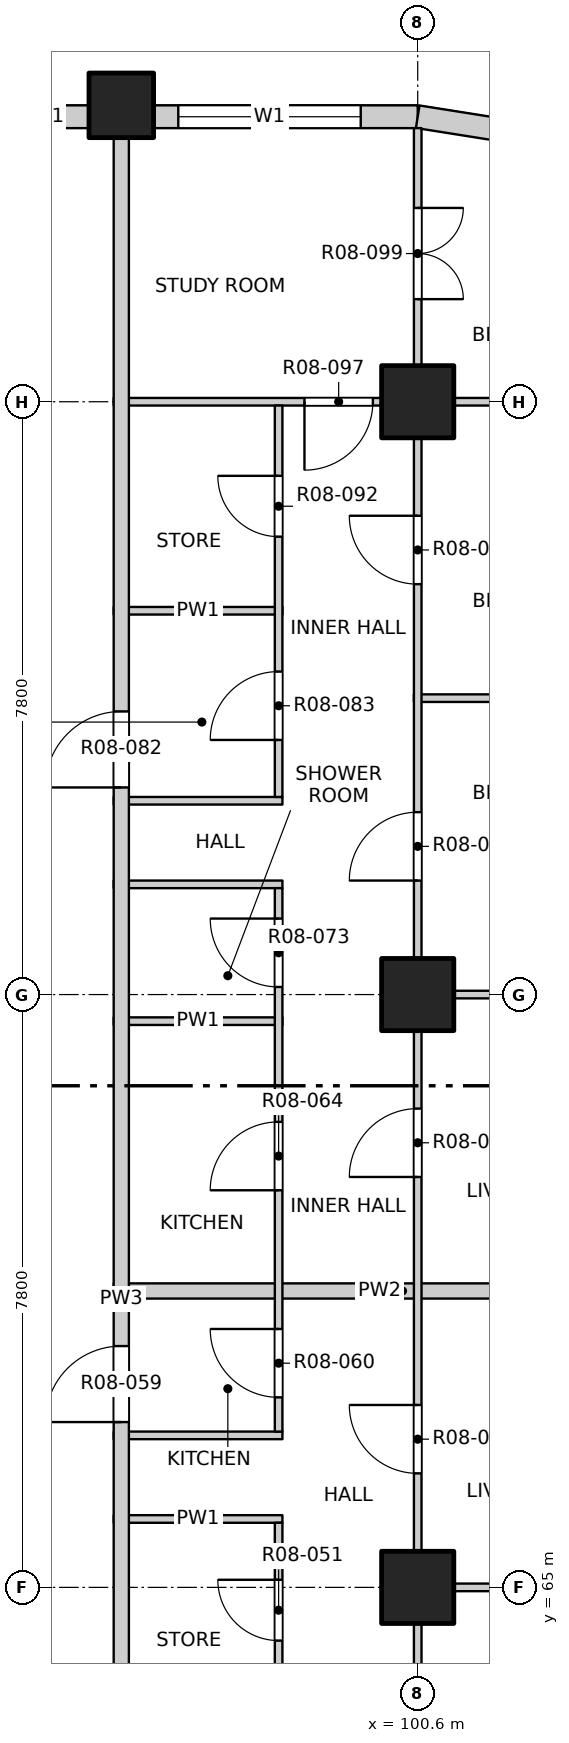
"""IFC4 building model, lengths in metres.
Left out: names, types, materials, properties, quantities, classifications, styles, units other than length and angle.
Written with IfcOpenShell. Run it as: python <this file> out.ifc"""

import sys

from ifc_helpers import new_model, si_unit, direction, frame, frame_2d, origin, origin_2d, place, context, subcontext, project, spatial, rectangle, extrude, element, fill, save


model = new_model("IFC4")
c1 = context("Model", 3, precision=1e-05, world=origin(), true_north=direction((0.0, 1.0)))
c2 = subcontext(c1, "Body", "Model", "MODEL_VIEW")
j1 = project(units=[si_unit("LENGTHUNIT", "METRE"), si_unit("PLANEANGLEUNIT", "RADIAN")], contexts=[c1])
p1 = place(None, origin())
s1 = spatial("IfcSite", under=j1, at=p1, CompositionType="ELEMENT")
p2 = place(p1, origin())
s2 = spatial("IfcBuilding", under=s1, at=p2, CompositionType="ELEMENT")
p3 = place(p2, frame((0.0, 0.0, 103.3)))
s3 = spatial("IfcBuildingStorey", under=s2, at=p3, CompositionType="ELEMENT", Elevation=103.3)
p4 = place(p3, frame((96.7, 84.5, -0.25), z_axis=(0.0, 0.0, 1.0), x_axis=(1.0, 0.0, 0.0)))
e1 = element("IfcColumn", 1, at=p4, inside=s3, PredefinedType="COLUMN", context=c2, shape_type="SweptSolid", body=[
    extrude(rectangle(XDim=0.85, YDim=0.85, at=origin_2d()), origin(), (0.0, 0.0, 1.0), 3.4),
])
for number, where, z_axis, x_axis in (
    (2, (100.6, 65.0, -0.25), (0.0, 0.0, 1.0), (1.0, 0.0, 0.0)),
    (3, (100.6, 72.8, -0.25), (0.0, 0.0, 1.0), (1.0, 0.0, 0.0)),
    (4, (100.6, 80.6, -0.25), (0.0, 0.0, 1.0), (1.0, 0.0, 0.0)),
):
    element("IfcColumn", number, at=place(p3, frame(where, z_axis=z_axis, x_axis=x_axis)), inside=s3, PredefinedType="COLUMN", context=c2, shape_type="SweptSolid", body=[
        extrude(rectangle(XDim=0.95, YDim=0.95, at=origin_2d()), origin(), (0.0, 0.0, 1.0), 3.4),
    ])
p5 = place(p3, frame((95.025, 84.35, 0.0), z_axis=(0.0, 0.0, 1.0), x_axis=(1.0, 0.0, 0.0)))
e5 = element("IfcWall", 5, at=p5, inside=s3, PredefinedType="SOLIDWALL", context=c2, shape_type="SweptSolid", body=[
    extrude(rectangle(XDim=1.25, YDim=0.3, at=frame_2d((0.625, 0.0))), origin(), (0.0, 0.0, 1.0), 2.7),
])
p6 = place(p3, frame((97.125, 84.35, 0.0), z_axis=(0.0, 0.0, 1.0), x_axis=(1.0, 0.0, 0.0)))
e6 = element("IfcWall", 6, at=p6, inside=s3, PredefinedType="SOLIDWALL", context=c2, shape_type="SweptSolid", body=[
    extrude(rectangle(XDim=3.475, YDim=0.3, at=frame_2d((1.738, 0.0))), origin(), (0.0, 0.0, 1.0), 2.7),
])
p7 = place(p6, frame((0.325, 0.0, 0.9)))
e7 = element("IfcOpeningElement", 7, at=p7, cuts=e6, PredefinedType="OPENING", context=c2, shape_type="SweptSolid", body=[
    extrude(rectangle(XDim=2.4, YDim=1.8, at=frame_2d((1.2, 0.9))), frame((0.0, 0.16, 0.0), z_axis=(0.0, -1.0, 0.0), x_axis=(1.0, 0.0, 0.0)), (0.0, 0.0, 1.0), 0.32),
])
p8 = place(p3, frame((101.759, 84.167, 0.0), z_axis=(0.0, 0.0, 1.0), x_axis=(-0.987678452879, 0.156496880861, 0.0)))
e8 = element("IfcWall", 8, at=p8, inside=s3, PredefinedType="SOLIDWALL", context=c2, shape_type="SweptSolid", body=[
    extrude(rectangle(XDim=1.173, YDim=0.3, at=frame_2d((0.586, 0.0))), origin(), (0.0, 0.0, 1.0), 2.7),
])
p9 = place(p3, frame((100.55, 65.0, 0.0), z_axis=(0.0, 0.0, 1.0), x_axis=(1.0, 0.0, 0.0)))
e9 = element("IfcWall", 9, at=p9, inside=s3, PredefinedType="PARTITIONING", context=c2, shape_type="SweptSolid", body=[
    extrude(rectangle(XDim=3.65, YDim=0.1, at=frame_2d((1.825, 0.0))), origin(), (0.0, 0.0, 1.0), 3.15),
])
for number, where, z_axis, x_axis in (
    (10, (96.6, 65.9, 0.0), (0.0, 0.0, 1.0), (1.0, 0.0, 0.0)),
    (11, (96.6, 67.0, 0.0), (0.0, 0.0, 1.0), (1.0, 0.0, 0.0)),
):
    element("IfcWall", number, at=place(p3, frame(where, z_axis=z_axis, x_axis=x_axis)), inside=s3, PredefinedType="PARTITIONING", context=c2, shape_type="SweptSolid", body=[
        extrude(rectangle(XDim=2.22, YDim=0.1, at=frame_2d((1.11, 0.0))), origin(), (0.0, 0.0, 1.0), 3.15),
    ])
p10 = place(p3, frame((96.6, 68.9, 0.0), z_axis=(0.0, 0.0, 1.0), x_axis=(1.0, 0.0, 0.0)))
e12 = element("IfcWall", 12, at=p10, inside=s3, PredefinedType="PARTITIONING", context=c2, shape_type="SweptSolid", body=[
    extrude(rectangle(XDim=7.6, YDim=0.2, at=frame_2d((3.8, 0.0))), origin(), (0.0, 0.0, 1.0), 2.55),
])
p11 = place(p3, frame((96.6, 72.45, 0.0), z_axis=(0.0, 0.0, 1.0), x_axis=(1.0, 0.0, 0.0)))
e13 = element("IfcWall", 13, at=p11, inside=s3, PredefinedType="PARTITIONING", context=c2, shape_type="SweptSolid", body=[
    extrude(rectangle(XDim=2.22, YDim=0.1, at=frame_2d((1.11, 0.0))), origin(), (0.0, 0.0, 1.0), 3.15),
])
p12 = place(p3, frame((100.55, 72.8, 0.0), z_axis=(0.0, 0.0, 1.0), x_axis=(1.0, 0.0, 0.0)))
e14 = element("IfcWall", 14, at=p12, inside=s3, PredefinedType="PARTITIONING", context=c2, shape_type="SweptSolid", body=[
    extrude(rectangle(XDim=3.65, YDim=0.1, at=frame_2d((1.825, 0.0))), origin(), (0.0, 0.0, 1.0), 3.15),
])
for number, where, z_axis, x_axis in (
    (15, (96.6, 74.25, 0.0), (0.0, 0.0, 1.0), (1.0, 0.0, 0.0)),
    (16, (96.6, 75.35, 0.0), (0.0, 0.0, 1.0), (1.0, 0.0, 0.0)),
):
    element("IfcWall", number, at=place(p3, frame(where, z_axis=z_axis, x_axis=x_axis)), inside=s3, PredefinedType="PARTITIONING", context=c2, shape_type="SweptSolid", body=[
        extrude(rectangle(XDim=2.22, YDim=0.1, at=frame_2d((1.11, 0.0))), origin(), (0.0, 0.0, 1.0), 3.15),
    ])
p13 = place(p3, frame((100.55, 76.7, 0.0), z_axis=(0.0, 0.0, 1.0), x_axis=(1.0, 0.0, 0.0)))
e17 = element("IfcWall", 17, at=p13, inside=s3, PredefinedType="PARTITIONING", context=c2, shape_type="SweptSolid", body=[
    extrude(rectangle(XDim=3.65, YDim=0.1, at=frame_2d((1.825, 0.0))), origin(), (0.0, 0.0, 1.0), 2.55),
])
p14 = place(p3, frame((96.6, 77.85, 0.0), z_axis=(0.0, 0.0, 1.0), x_axis=(1.0, 0.0, 0.0)))
e18 = element("IfcWall", 18, at=p14, inside=s3, PredefinedType="PARTITIONING", context=c2, shape_type="SweptSolid", body=[
    extrude(rectangle(XDim=2.22, YDim=0.1, at=frame_2d((1.11, 0.0))), origin(), (0.0, 0.0, 1.0), 3.15),
])
p15 = place(p3, frame((96.6, 80.6, 0.0), z_axis=(0.0, 0.0, 1.0), x_axis=(1.0, 0.0, 0.0)))
e19 = element("IfcWall", 19, at=p15, inside=s3, PredefinedType="PARTITIONING", context=c2, shape_type="SweptSolid", body=[
    extrude(rectangle(XDim=7.6, YDim=0.1, at=frame_2d((3.8, 0.0))), origin(), (0.0, 0.0, 1.0), 3.15),
])
p16 = place(p15, frame((2.51, 0.0, 0.0)))
e20 = element("IfcOpeningElement", 20, at=p16, cuts=e19, PredefinedType="OPENING", context=c2, shape_type="SweptSolid", body=[
    extrude(rectangle(XDim=0.9, YDim=2.1, at=frame_2d((0.45, 1.05))), frame((0.0, 0.06, 0.0), z_axis=(0.0, -1.0, 0.0), x_axis=(1.0, 0.0, 0.0)), (0.0, 0.0, 1.0), 0.12),
])
p17 = place(p3, frame((96.7, 53.4, 0.0), z_axis=(0.0, 0.0, 1.0), x_axis=(0.0, 1.0, 0.0)))
e21 = element("IfcWall", 21, at=p17, inside=s3, PredefinedType="PARTITIONING", context=c2, shape_type="SweptSolid", body=[
    extrude(rectangle(XDim=30.8, YDim=0.2, at=frame_2d((15.4, 0.0))), origin(), (0.0, 0.0, 1.0), 3.15),
])
p18 = place(p17, frame((5.525, 0.0, 0.0)))
e22 = element("IfcOpeningElement", 22, at=p18, cuts=e21, PredefinedType="OPENING", context=c2, shape_type="SweptSolid", body=[
    extrude(rectangle(XDim=1.0, YDim=2.1, at=frame_2d((0.5, 1.05))), frame((0.0, 0.11, 0.0), z_axis=(0.0, -1.0, 0.0), x_axis=(1.0, 0.0, 0.0)), (0.0, 0.0, 1.0), 0.22),
])
p19 = place(p17, frame((13.775, 0.0, 0.0)))
e23 = element("IfcOpeningElement", 23, at=p19, cuts=e21, PredefinedType="OPENING", context=c2, shape_type="SweptSolid", body=[
    extrude(rectangle(XDim=1.0, YDim=2.1, at=frame_2d((0.5, 1.05))), frame((0.0, 0.11, 0.0), z_axis=(0.0, -1.0, 0.0), x_axis=(1.0, 0.0, 0.0)), (0.0, 0.0, 1.0), 0.22),
])
p20 = place(p17, frame((22.125, 0.0, 0.0)))
e24 = element("IfcOpeningElement", 24, at=p20, cuts=e21, PredefinedType="OPENING", context=c2, shape_type="SweptSolid", body=[
    extrude(rectangle(XDim=1.0, YDim=2.1, at=frame_2d((0.5, 1.05))), frame((0.0, 0.11, 0.0), z_axis=(0.0, -1.0, 0.0), x_axis=(1.0, 0.0, 0.0)), (0.0, 0.0, 1.0), 0.22),
])
p21 = place(p3, frame((98.77, 58.8, 0.0), z_axis=(0.0, 0.0, 1.0), x_axis=(0.0, 1.0, 0.0)))
e25 = element("IfcWall", 25, at=p21, inside=s3, PredefinedType="PARTITIONING", context=c2, shape_type="SweptSolid", body=[
    extrude(rectangle(XDim=7.05, YDim=0.1, at=frame_2d((3.525, 0.0))), origin(), (0.0, 0.0, 1.0), 3.15),
])
p22 = place(p21, frame((0.675, 0.0, 0.0)))
e26 = element("IfcOpeningElement", 26, at=p22, cuts=e25, PredefinedType="OPENING", context=c2, shape_type="SweptSolid", body=[
    extrude(rectangle(XDim=0.9, YDim=2.1, at=frame_2d((0.45, 1.05))), frame((0.0, 0.06, 0.0), z_axis=(0.0, -1.0, 0.0), x_axis=(1.0, 0.0, 0.0)), (0.0, 0.0, 1.0), 0.12),
])
p23 = place(p21, frame((3.05, 0.0, 0.0)))
e27 = element("IfcOpeningElement", 27, at=p23, cuts=e25, PredefinedType="OPENING", context=c2, shape_type="SweptSolid", body=[
    extrude(rectangle(XDim=0.9, YDim=2.1, at=frame_2d((0.45, 1.05))), frame((0.0, 0.06, 0.0), z_axis=(0.0, -1.0, 0.0), x_axis=(1.0, 0.0, 0.0)), (0.0, 0.0, 1.0), 0.12),
])
p24 = place(p21, frame((5.5, 0.0, 0.0)))
e28 = element("IfcOpeningElement", 28, at=p24, cuts=e25, PredefinedType="OPENING", context=c2, shape_type="SweptSolid", body=[
    extrude(rectangle(XDim=0.8, YDim=2.1, at=frame_2d((0.4, 1.05))), frame((0.0, 0.06, 0.0), z_axis=(0.0, -1.0, 0.0), x_axis=(1.0, 0.0, 0.0)), (0.0, 0.0, 1.0), 0.12),
])
p25 = place(p3, frame((98.77, 67.05, 0.0), z_axis=(0.0, 0.0, 1.0), x_axis=(0.0, 1.0, 0.0)))
e29 = element("IfcWall", 29, at=p25, inside=s3, PredefinedType="PARTITIONING", context=c2, shape_type="SweptSolid", body=[
    extrude(rectangle(XDim=7.15, YDim=0.1, at=frame_2d((3.575, 0.0))), origin(), (0.0, 0.0, 1.0), 3.15),
])
p26 = place(p25, frame((0.45, 0.0, 0.0)))
e30 = element("IfcOpeningElement", 30, at=p26, cuts=e29, PredefinedType="OPENING", context=c2, shape_type="SweptSolid", body=[
    extrude(rectangle(XDim=0.9, YDim=2.1, at=frame_2d((0.45, 1.05))), frame((0.0, 0.06, 0.0), z_axis=(0.0, -1.0, 0.0), x_axis=(1.0, 0.0, 0.0)), (0.0, 0.0, 1.0), 0.12),
])
p27 = place(p25, frame((3.175, 0.0, 0.0)))
e31 = element("IfcOpeningElement", 31, at=p27, cuts=e29, PredefinedType="OPENING", context=c2, shape_type="SweptSolid", body=[
    extrude(rectangle(XDim=0.9, YDim=2.1, at=frame_2d((0.45, 1.05))), frame((0.0, 0.06, 0.0), z_axis=(0.0, -1.0, 0.0), x_axis=(1.0, 0.0, 0.0)), (0.0, 0.0, 1.0), 0.12),
])
p28 = place(p25, frame((5.85, 0.0, 0.0)))
e32 = element("IfcOpeningElement", 32, at=p28, cuts=e29, PredefinedType="OPENING", context=c2, shape_type="SweptSolid", body=[
    extrude(rectangle(XDim=0.9, YDim=2.1, at=frame_2d((0.45, 1.05))), frame((0.0, 0.06, 0.0), z_axis=(0.0, -1.0, 0.0), x_axis=(1.0, 0.0, 0.0)), (0.0, 0.0, 1.0), 0.12),
])
p29 = place(p3, frame((98.77, 75.4, 0.0), z_axis=(0.0, 0.0, 1.0), x_axis=(0.0, 1.0, 0.0)))
e33 = element("IfcWall", 33, at=p29, inside=s3, PredefinedType="PARTITIONING", context=c2, shape_type="SweptSolid", body=[
    extrude(rectangle(XDim=5.15, YDim=0.1, at=frame_2d((2.575, 0.0))), origin(), (0.0, 0.0, 1.0), 3.15),
])
p30 = place(p29, frame((0.75, 0.0, 0.0)))
e34 = element("IfcOpeningElement", 34, at=p30, cuts=e33, PredefinedType="OPENING", context=c2, shape_type="SweptSolid", body=[
    extrude(rectangle(XDim=0.9, YDim=2.1, at=frame_2d((0.45, 1.05))), frame((0.0, 0.06, 0.0), z_axis=(0.0, -1.0, 0.0), x_axis=(1.0, 0.0, 0.0)), (0.0, 0.0, 1.0), 0.12),
])
p31 = place(p29, frame((3.425, 0.0, 0.0)))
e35 = element("IfcOpeningElement", 35, at=p31, cuts=e33, PredefinedType="OPENING", context=c2, shape_type="SweptSolid", body=[
    extrude(rectangle(XDim=0.8, YDim=2.1, at=frame_2d((0.4, 1.05))), frame((0.0, 0.06, 0.0), z_axis=(0.0, -1.0, 0.0), x_axis=(1.0, 0.0, 0.0)), (0.0, 0.0, 1.0), 0.12),
])
p32 = place(p3, frame((100.6, 45.8, 0.0), z_axis=(0.0, 0.0, 1.0), x_axis=(0.0, 1.0, 0.0)))
e36 = element("IfcWall", 36, at=p32, inside=s3, PredefinedType="PARTITIONING", context=c2, shape_type="SweptSolid", body=[
    extrude(rectangle(XDim=38.4, YDim=0.1, at=frame_2d((19.2, 0.0))), origin(), (0.0, 0.0, 1.0), 3.15),
])
p33 = place(p32, frame((1.05, 0.0, 0.0)))
e37 = element("IfcOpeningElement", 37, at=p33, cuts=e36, PredefinedType="OPENING", context=c2, shape_type="SweptSolid", body=[
    extrude(rectangle(XDim=1.2, YDim=2.1, at=frame_2d((0.6, 1.05))), frame((0.0, 0.06, 0.0), z_axis=(0.0, -1.0, 0.0), x_axis=(1.0, 0.0, 0.0)), (0.0, 0.0, 1.0), 0.12),
])
p34 = place(p32, frame((5.1, 0.0, 0.0)))
e38 = element("IfcOpeningElement", 38, at=p34, cuts=e36, PredefinedType="OPENING", context=c2, shape_type="SweptSolid", body=[
    extrude(rectangle(XDim=0.9, YDim=2.1, at=frame_2d((0.45, 1.05))), frame((0.0, 0.06, 0.0), z_axis=(0.0, -1.0, 0.0), x_axis=(1.0, 0.0, 0.0)), (0.0, 0.0, 1.0), 0.12),
])
p35 = place(p32, frame((9.0, 0.0, 0.0)))
e39 = element("IfcOpeningElement", 39, at=p35, cuts=e36, PredefinedType="OPENING", context=c2, shape_type="SweptSolid", body=[
    extrude(rectangle(XDim=0.9, YDim=2.1, at=frame_2d((0.45, 1.05))), frame((0.0, 0.06, 0.0), z_axis=(0.0, -1.0, 0.0), x_axis=(1.0, 0.0, 0.0)), (0.0, 0.0, 1.0), 0.12),
])
p36 = place(p32, frame((12.9, 0.0, 0.0)))
e40 = element("IfcOpeningElement", 40, at=p36, cuts=e36, PredefinedType="OPENING", context=c2, shape_type="SweptSolid", body=[
    extrude(rectangle(XDim=0.9, YDim=2.1, at=frame_2d((0.45, 1.05))), frame((0.0, 0.06, 0.0), z_axis=(0.0, -1.0, 0.0), x_axis=(1.0, 0.0, 0.0)), (0.0, 0.0, 1.0), 0.12),
])
p37 = place(p32, frame((16.8, 0.0, 0.0)))
e41 = element("IfcOpeningElement", 41, at=p37, cuts=e36, PredefinedType="OPENING", context=c2, shape_type="SweptSolid", body=[
    extrude(rectangle(XDim=0.9, YDim=2.1, at=frame_2d((0.45, 1.05))), frame((0.0, 0.06, 0.0), z_axis=(0.0, -1.0, 0.0), x_axis=(1.0, 0.0, 0.0)), (0.0, 0.0, 1.0), 0.12),
])
p38 = place(p32, frame((20.7, 0.0, 0.0)))
e42 = element("IfcOpeningElement", 42, at=p38, cuts=e36, PredefinedType="OPENING", context=c2, shape_type="SweptSolid", body=[
    extrude(rectangle(XDim=0.9, YDim=2.1, at=frame_2d((0.45, 1.05))), frame((0.0, 0.06, 0.0), z_axis=(0.0, -1.0, 0.0), x_axis=(1.0, 0.0, 0.0)), (0.0, 0.0, 1.0), 0.12),
])
p39 = place(p32, frame((24.6, 0.0, 0.0)))
e43 = element("IfcOpeningElement", 43, at=p39, cuts=e36, PredefinedType="OPENING", context=c2, shape_type="SweptSolid", body=[
    extrude(rectangle(XDim=0.9, YDim=2.1, at=frame_2d((0.45, 1.05))), frame((0.0, 0.06, 0.0), z_axis=(0.0, -1.0, 0.0), x_axis=(1.0, 0.0, 0.0)), (0.0, 0.0, 1.0), 0.12),
])
p40 = place(p32, frame((28.5, 0.0, 0.0)))
e44 = element("IfcOpeningElement", 44, at=p40, cuts=e36, PredefinedType="OPENING", context=c2, shape_type="SweptSolid", body=[
    extrude(rectangle(XDim=0.9, YDim=2.1, at=frame_2d((0.45, 1.05))), frame((0.0, 0.06, 0.0), z_axis=(0.0, -1.0, 0.0), x_axis=(1.0, 0.0, 0.0)), (0.0, 0.0, 1.0), 0.12),
])
p41 = place(p32, frame((32.4, 0.0, 0.0)))
e45 = element("IfcOpeningElement", 45, at=p41, cuts=e36, PredefinedType="OPENING", context=c2, shape_type="SweptSolid", body=[
    extrude(rectangle(XDim=0.9, YDim=2.1, at=frame_2d((0.45, 1.05))), frame((0.0, 0.06, 0.0), z_axis=(0.0, -1.0, 0.0), x_axis=(1.0, 0.0, 0.0)), (0.0, 0.0, 1.0), 0.12),
])
p42 = place(p32, frame((36.15, 0.0, 0.0)))
e46 = element("IfcOpeningElement", 46, at=p42, cuts=e36, PredefinedType="OPENING", context=c2, shape_type="SweptSolid", body=[
    extrude(rectangle(XDim=1.2, YDim=2.1, at=frame_2d((0.6, 1.05))), frame((0.0, 0.06, 0.0), z_axis=(0.0, -1.0, 0.0), x_axis=(1.0, 0.0, 0.0)), (0.0, 0.0, 1.0), 0.12),
])
p43 = place(p7, origin())
e47 = element("IfcWindow", 47, at=p43, inside=s3, PartitioningType="DOUBLE_PANEL_VERTICAL", PredefinedType="WINDOW", context=c2, shape_type="SweptSolid", body=[
    extrude(rectangle(XDim=2.4, YDim=1.8, at=frame_2d((1.2, 0.9))), frame((0.0, 0.03, 0.0), z_axis=(0.0, -1.0, 0.0), x_axis=(1.0, 0.0, 0.0)), (0.0, 0.0, 1.0), 0.06),
])
fill(e7, e47)
p44 = place(p24, origin())
e48 = element("IfcDoor", 48, at=p44, inside=s3, OperationType="SINGLE_SWING_RIGHT", PredefinedType="DOOR", context=c2, shape_type="SweptSolid", body=[
    extrude(rectangle(XDim=0.8, YDim=2.1, at=frame_2d((0.4, 1.05))), frame((0.0, 0.025, 0.0), z_axis=(0.0, -1.0, 0.0), x_axis=(1.0, 0.0, 0.0)), (0.0, 0.0, 1.0), 0.05),
])
fill(e28, e48)
p45 = place(p38, origin())
e49 = element("IfcDoor", 49, at=p45, inside=s3, OperationType="SINGLE_SWING_RIGHT", PredefinedType="DOOR", context=c2, shape_type="SweptSolid", body=[
    extrude(rectangle(XDim=0.9, YDim=2.1, at=frame_2d((0.45, 1.05))), frame((0.0, 0.025, 0.0), z_axis=(0.0, -1.0, 0.0), x_axis=(1.0, 0.0, 0.0)), (0.0, 0.0, 1.0), 0.05),
])
fill(e42, e49)
p46 = place(p19, origin())
e50 = element("IfcDoor", 50, at=p46, inside=s3, OperationType="SINGLE_SWING_LEFT", PredefinedType="DOOR", context=c2, shape_type="SweptSolid", body=[
    extrude(rectangle(XDim=1.0, YDim=2.1, at=frame_2d((0.5, 1.05))), frame((0.0, 0.025, 0.0), z_axis=(0.0, -1.0, 0.0), x_axis=(1.0, 0.0, 0.0)), (0.0, 0.0, 1.0), 0.05),
])
fill(e23, e50)
p47 = place(p26, origin())
e51 = element("IfcDoor", 51, at=p47, inside=s3, OperationType="SINGLE_SWING_RIGHT", PredefinedType="DOOR", context=c2, shape_type="SweptSolid", body=[
    extrude(rectangle(XDim=0.9, YDim=2.1, at=frame_2d((0.45, 1.05))), frame((0.0, 0.025, 0.0), z_axis=(0.0, -1.0, 0.0), x_axis=(1.0, 0.0, 0.0)), (0.0, 0.0, 1.0), 0.05),
])
fill(e30, e51)
p48 = place(p27, origin())
e52 = element("IfcDoor", 52, at=p48, inside=s3, OperationType="SINGLE_SWING_LEFT", PredefinedType="DOOR", context=c2, shape_type="SweptSolid", body=[
    extrude(rectangle(XDim=0.9, YDim=2.1, at=frame_2d((0.45, 1.05))), frame((0.0, 0.025, 0.0), z_axis=(0.0, -1.0, 0.0), x_axis=(1.0, 0.0, 0.0)), (0.0, 0.0, 1.0), 0.05),
])
fill(e31, e52)
p49 = place(p39, origin())
e53 = element("IfcDoor", 53, at=p49, inside=s3, OperationType="SINGLE_SWING_LEFT", PredefinedType="DOOR", context=c2, shape_type="SweptSolid", body=[
    extrude(rectangle(XDim=0.9, YDim=2.1, at=frame_2d((0.45, 1.05))), frame((0.0, 0.025, 0.0), z_axis=(0.0, -1.0, 0.0), x_axis=(1.0, 0.0, 0.0)), (0.0, 0.0, 1.0), 0.05),
])
fill(e43, e53)
p50 = place(p28, origin())
e54 = element("IfcDoor", 54, at=p50, inside=s3, OperationType="SINGLE_SWING_RIGHT", PredefinedType="DOOR", context=c2, shape_type="SweptSolid", body=[
    extrude(rectangle(XDim=0.9, YDim=2.1, at=frame_2d((0.45, 1.05))), frame((0.0, 0.025, 0.0), z_axis=(0.0, -1.0, 0.0), x_axis=(1.0, 0.0, 0.0)), (0.0, 0.0, 1.0), 0.05),
])
fill(e32, e54)
p51 = place(p40, origin())
e55 = element("IfcDoor", 55, at=p51, inside=s3, OperationType="SINGLE_SWING_LEFT", PredefinedType="DOOR", context=c2, shape_type="SweptSolid", body=[
    extrude(rectangle(XDim=0.9, YDim=2.1, at=frame_2d((0.45, 1.05))), frame((0.0, 0.025, 0.0), z_axis=(0.0, -1.0, 0.0), x_axis=(1.0, 0.0, 0.0)), (0.0, 0.0, 1.0), 0.05),
])
fill(e44, e55)
p52 = place(p20, origin())
e56 = element("IfcDoor", 56, at=p52, inside=s3, OperationType="SINGLE_SWING_LEFT", PredefinedType="DOOR", context=c2, shape_type="SweptSolid", body=[
    extrude(rectangle(XDim=1.0, YDim=2.1, at=frame_2d((0.5, 1.05))), frame((0.0, 0.025, 0.0), z_axis=(0.0, -1.0, 0.0), x_axis=(1.0, 0.0, 0.0)), (0.0, 0.0, 1.0), 0.05),
])
fill(e24, e56)
p53 = place(p30, origin())
e57 = element("IfcDoor", 57, at=p53, inside=s3, OperationType="SINGLE_SWING_LEFT", PredefinedType="DOOR", context=c2, shape_type="SweptSolid", body=[
    extrude(rectangle(XDim=0.9, YDim=2.1, at=frame_2d((0.45, 1.05))), frame((0.0, 0.025, 0.0), z_axis=(0.0, -1.0, 0.0), x_axis=(1.0, 0.0, 0.0)), (0.0, 0.0, 1.0), 0.05),
])
fill(e34, e57)
p54 = place(p41, origin())
e58 = element("IfcDoor", 58, at=p54, inside=s3, OperationType="SINGLE_SWING_RIGHT", PredefinedType="DOOR", context=c2, shape_type="SweptSolid", body=[
    extrude(rectangle(XDim=0.9, YDim=2.1, at=frame_2d((0.45, 1.05))), frame((0.0, 0.025, 0.0), z_axis=(0.0, -1.0, 0.0), x_axis=(1.0, 0.0, 0.0)), (0.0, 0.0, 1.0), 0.05),
])
fill(e45, e58)
p55 = place(p31, origin())
e59 = element("IfcDoor", 59, at=p55, inside=s3, OperationType="SINGLE_SWING_RIGHT", PredefinedType="DOOR", context=c2, shape_type="SweptSolid", body=[
    extrude(rectangle(XDim=0.8, YDim=2.1, at=frame_2d((0.4, 1.05))), frame((0.0, 0.025, 0.0), z_axis=(0.0, -1.0, 0.0), x_axis=(1.0, 0.0, 0.0)), (0.0, 0.0, 1.0), 0.05),
])
fill(e35, e59)
p56 = place(p16, origin())
e60 = element("IfcDoor", 60, at=p56, inside=s3, OperationType="SINGLE_SWING_RIGHT", PredefinedType="DOOR", context=c2, shape_type="SweptSolid", body=[
    extrude(rectangle(XDim=0.9, YDim=2.1, at=frame_2d((0.45, 1.05))), frame((0.0, 0.025, 0.0), z_axis=(0.0, -1.0, 0.0), x_axis=(1.0, 0.0, 0.0)), (0.0, 0.0, 1.0), 0.05),
])
fill(e20, e60)
p57 = place(p42, origin())
e61 = element("IfcDoor", 61, at=p57, inside=s3, OperationType="DOUBLE_DOOR_SINGLE_SWING", PredefinedType="DOOR", context=c2, shape_type="SweptSolid", body=[
    extrude(rectangle(XDim=1.2, YDim=2.1, at=frame_2d((0.6, 1.05))), frame((0.0, 0.025, 0.0), z_axis=(0.0, -1.0, 0.0), x_axis=(1.0, 0.0, 0.0)), (0.0, 0.0, 1.0), 0.05),
])
fill(e46, e61)
save(model, sys.argv[1])
